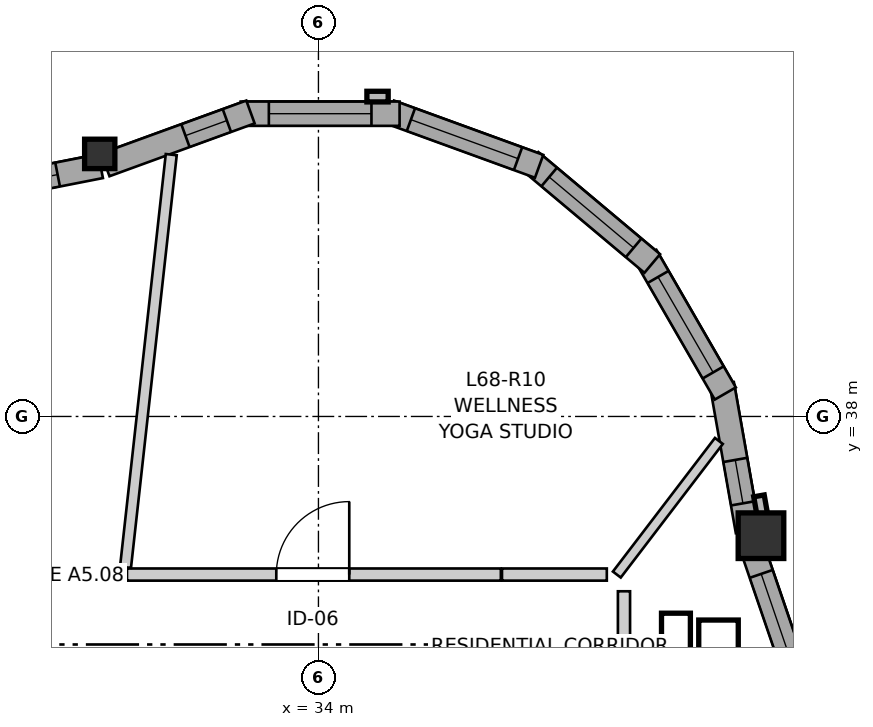
"""IFC4 building model, lengths in metres.
Left out: names, types, materials, properties, quantities, classifications, styles, units other than length and angle.
Written with IfcOpenShell. Run it as: python <this file> out.ifc"""

import sys

from ifc_helpers import new_model, si_unit, direction, frame, frame_2d, origin, origin_2d, place, context, subcontext, project, spatial, rectangle, i_section, extrude, source, transform, mapped, element, fill, save


model = new_model("IFC4")
c1 = context("Model", 3, precision=1e-05, world=origin(), true_north=direction((0.0, 1.0)))
c2 = subcontext(c1, "Body", "Model", "MODEL_VIEW")
j1 = project(units=[si_unit("LENGTHUNIT", "METRE"), si_unit("PLANEANGLEUNIT", "RADIAN")], contexts=[c1])
p1 = place(None, origin())
s1 = spatial("IfcSite", under=j1, at=p1, CompositionType="ELEMENT")
p2 = place(p1, origin())
s2 = spatial("IfcBuilding", under=s1, at=p2, CompositionType="ELEMENT")
p3 = place(p2, frame((0.0, 0.0, 227.6)))
s3 = spatial("IfcBuildingStorey", under=s2, at=p3, CompositionType="ELEMENT", Elevation=227.6)
m1 = source(origin(), c2, "Body", "SweptSolid", [
    extrude(rectangle(XDim=0.6, YDim=0.6, at=origin_2d()), origin(), (0.0, 0.0, 1.0), 2.96),
])
p4 = place(p3, frame((39.823, 36.431, 0.0), z_axis=(0.0, 0.0, 1.0), x_axis=(1.0, 0.0, 0.0)))
e1 = element("IfcColumn", 1, at=p4, inside=s3, PredefinedType="COLUMN", context=c2, shape_type="MappedRepresentation", body=[
    mapped(m1, transform((0.0, 0.0, 0.0), x_axis=(1.0, 0.0, 0.0), y_axis=(0.0, 1.0, 0.0), z_axis=(0.0, 0.0, 1.0), scale=1.0)),
])
m2 = source(origin(), c2, "Body", "SweptSolid", [
    extrude(i_section(OverallWidth=0.398, OverallDepth=0.387, WebThickness=0.019, FlangeThickness=0.03, FilletRadius=0.015, at=origin_2d()), origin(), (0.0, 0.0, 1.0), 2.96),
])
p5 = place(p3, frame((31.123, 41.454, 0.0), z_axis=(0.0, 0.0, 1.0), x_axis=(1.0, 0.0, 0.0)))
e2 = element("IfcColumn", 2, at=p5, inside=s3, PredefinedType="PILASTER", context=c2, shape_type="MappedRepresentation", body=[
    mapped(m2, transform((0.0, 0.0, 0.0), x_axis=(1.0, 0.0, 0.0), y_axis=(0.0, 1.0, 0.0), z_axis=(0.0, 0.0, 1.0), scale=1.0)),
])
p6 = place(p3, frame((40.397, 34.257, 0.0), z_axis=(0.0, 0.0, 1.0), x_axis=(-0.323634249216, 0.9461822619, 0.0)))
e3 = element("IfcWall", 3, at=p6, inside=s3, PredefinedType="SOLIDWALL", context=c2, shape_type="SweptSolid", body=[
    extrude(rectangle(XDim=2.153, YDim=0.32, at=frame_2d((1.077, 0.0))), origin(), (0.0, 0.0, 1.0), 2.58),
])
p7 = place(p6, frame((0.316, 0.0, 0.82)))
e4 = element("IfcOpeningElement", 4, at=p7, cuts=e3, PredefinedType="OPENING", context=c2, shape_type="SweptSolid", body=[
    extrude(rectangle(XDim=1.45, YDim=1.25, at=frame_2d((0.725, 0.625))), frame((0.0, 0.17, 0.0), z_axis=(0.0, -1.0, 0.0), x_axis=(1.0, 0.0, 0.0)), (0.0, 0.0, 1.0), 0.34),
])
p8 = place(p3, frame((39.649, 36.492, 0.0), z_axis=(0.0, 0.0, 1.0), x_axis=(-0.173693060482, 0.984799837906, 0.0)))
e5 = element("IfcWall", 5, at=p8, inside=s3, PredefinedType="SOLIDWALL", context=c2, shape_type="SweptSolid", body=[
    extrude(rectangle(XDim=1.962, YDim=0.32, at=frame_2d((0.981, 0.0))), origin(), (0.0, 0.0, 1.0), 2.58),
])
p9 = place(p8, frame((0.371, 0.0, 0.82)))
e6 = element("IfcOpeningElement", 6, at=p9, cuts=e5, PredefinedType="OPENING", context=c2, shape_type="SweptSolid", body=[
    extrude(rectangle(XDim=0.58, YDim=1.35, at=frame_2d((0.29, 0.675))), frame((0.0, 0.17, 0.0), z_axis=(0.0, -1.0, 0.0), x_axis=(1.0, 0.0, 0.0)), (0.0, 0.0, 1.0), 0.34),
])
p10 = place(p3, frame((39.353, 38.302, 0.0), z_axis=(0.0, 0.0, 1.0), x_axis=(-0.49990781971, 0.866078617559, 0.0)))
e7 = element("IfcWall", 7, at=p10, inside=s3, PredefinedType="SOLIDWALL", context=c2, shape_type="SweptSolid", body=[
    extrude(rectangle(XDim=2.09, YDim=0.32, at=frame_2d((1.045, 0.0))), origin(), (0.0, 0.0, 1.0), 2.58),
])
p11 = place(p10, frame((0.32, 0.0, 0.82)))
e8 = element("IfcOpeningElement", 8, at=p11, cuts=e7, PredefinedType="OPENING", context=c2, shape_type="SweptSolid", body=[
    extrude(rectangle(XDim=1.45, YDim=1.25, at=frame_2d((0.725, 0.625))), frame((0.0, 0.17, 0.0), z_axis=(0.0, -1.0, 0.0), x_axis=(1.0, 0.0, 0.0)), (0.0, 0.0, 1.0), 0.34),
])
p12 = place(p3, frame((38.392, 40.012, 0.0), z_axis=(0.0, 0.0, 1.0), x_axis=(-0.766024572719, 0.642811289563, 0.0)))
e9 = element("IfcWall", 9, at=p12, inside=s3, PredefinedType="SOLIDWALL", context=c2, shape_type="SweptSolid", body=[
    extrude(rectangle(XDim=2.09, YDim=0.32, at=frame_2d((1.045, 0.0))), origin(), (0.0, 0.0, 1.0), 2.58),
])
p13 = place(p12, frame((0.32, 0.0, 0.82)))
e10 = element("IfcOpeningElement", 10, at=p13, cuts=e9, PredefinedType="OPENING", context=c2, shape_type="SweptSolid", body=[
    extrude(rectangle(XDim=1.45, YDim=1.25, at=frame_2d((0.725, 0.625))), frame((0.0, 0.17, 0.0), z_axis=(0.0, -1.0, 0.0), x_axis=(1.0, 0.0, 0.0)), (0.0, 0.0, 1.0), 0.34),
])
p14 = place(p3, frame((36.904, 41.291, 0.0), z_axis=(0.0, 0.0, 1.0), x_axis=(-0.939711556618, 0.341968113072, 0.0)))
e11 = element("IfcWall", 11, at=p14, inside=s3, PredefinedType="SOLIDWALL", context=c2, shape_type="SweptSolid", body=[
    extrude(rectangle(XDim=2.09, YDim=0.32, at=frame_2d((1.045, 0.0))), origin(), (0.0, 0.0, 1.0), 2.58),
])
p15 = place(p14, frame((0.295, 0.0, 0.82)))
e12 = element("IfcOpeningElement", 12, at=p15, cuts=e11, PredefinedType="OPENING", context=c2, shape_type="SweptSolid", body=[
    extrude(rectangle(XDim=1.5, YDim=1.45, at=frame_2d((0.75, 0.725))), frame((0.0, 0.17, 0.0), z_axis=(0.0, -1.0, 0.0), x_axis=(1.0, 0.0, 0.0)), (0.0, 0.0, 1.0), 0.34),
])
p16 = place(p3, frame((35.068, 41.983, 0.0), z_axis=(0.0, 0.0, 1.0), x_axis=(-1.0, 0.0, 0.0)))
e13 = element("IfcWall", 13, at=p16, inside=s3, PredefinedType="SOLIDWALL", context=c2, shape_type="SweptSolid", body=[
    extrude(rectangle(XDim=2.09, YDim=0.32, at=frame_2d((1.045, 0.0))), origin(), (0.0, 0.0, 1.0), 2.58),
])
p17 = place(p16, frame((0.37, 0.0, 0.82)))
e14 = element("IfcOpeningElement", 14, at=p17, cuts=e13, PredefinedType="OPENING", context=c2, shape_type="SweptSolid", body=[
    extrude(rectangle(XDim=1.35, YDim=1.45, at=frame_2d((0.675, 0.725))), frame((0.0, 0.17, 0.0), z_axis=(0.0, -1.0, 0.0), x_axis=(1.0, 0.0, 0.0)), (0.0, 0.0, 1.0), 0.34),
])
p18 = place(p3, frame((33.106, 42.006, 0.0), z_axis=(0.0, 0.0, 1.0), x_axis=(-0.939691662178, -0.342022777067, 0.0)))
e15 = element("IfcWall", 15, at=p18, inside=s3, PredefinedType="SOLIDWALL", context=c2, shape_type="SweptSolid", body=[
    extrude(rectangle(XDim=2.032, YDim=0.32, at=frame_2d((1.016, 0.0))), origin(), (0.0, 0.0, 1.0), 2.58),
])
p19 = place(p18, frame((0.33, 0.0, 0.82)))
e16 = element("IfcOpeningElement", 16, at=p19, cuts=e15, PredefinedType="OPENING", context=c2, shape_type="SweptSolid", body=[
    extrude(rectangle(XDim=0.58, YDim=1.35, at=frame_2d((0.29, 0.675))), frame((0.0, 0.17, 0.0), z_axis=(0.0, -1.0, 0.0), x_axis=(1.0, 0.0, 0.0)), (0.0, 0.0, 1.0), 0.34),
])
p20 = place(p3, frame((31.134, 41.293, 0.0), z_axis=(0.0, 0.0, 1.0), x_axis=(-0.981246594798, -0.19275663464, 0.0)))
e17 = element("IfcWall", 17, at=p20, inside=s3, PredefinedType="SOLIDWALL", context=c2, shape_type="SweptSolid", body=[
    extrude(rectangle(XDim=2.223, YDim=0.32, at=frame_2d((1.111, 0.0))), origin(), (0.0, 0.0, 1.0), 2.58),
])
p21 = place(p20, frame((0.576, 0.0, 0.82)))
e18 = element("IfcOpeningElement", 18, at=p21, cuts=e17, PredefinedType="OPENING", context=c2, shape_type="SweptSolid", body=[
    extrude(rectangle(XDim=1.05, YDim=1.45, at=frame_2d((0.525, 0.725))), frame((0.0, 0.17, 0.0), z_axis=(0.0, -1.0, 0.0), x_axis=(1.0, 0.0, 0.0)), (0.0, 0.0, 1.0), 0.34),
])
p22 = place(p3, frame((26.138, 35.92, 0.0), z_axis=(0.0, 0.0, 1.0), x_axis=(1.0, 0.0, 0.0)))
e19 = element("IfcWall", 19, at=p22, inside=s3, PredefinedType="PARTITIONING", context=c2, shape_type="SweptSolid", body=[
    extrude(rectangle(XDim=5.328, YDim=0.16, at=frame_2d((2.664, 0.0))), origin(), (0.0, 0.0, 1.0), 2.96),
])
p23 = place(p22, frame((2.185, 0.0, 0.0)))
e20 = element("IfcOpeningElement", 20, at=p23, cuts=e19, PredefinedType="OPENING", context=c2, shape_type="SweptSolid", body=[
    extrude(rectangle(XDim=0.96, YDim=2.1, at=frame_2d((0.48, 1.05))), frame((0.0, 0.09, 0.0), z_axis=(0.0, -1.0, 0.0), x_axis=(1.0, 0.0, 0.0)), (0.0, 0.0, 1.0), 0.18),
])
p24 = place(p3, frame((31.481, 35.92, 0.0), z_axis=(0.0, 0.0, 1.0), x_axis=(1.0, 0.0, 0.0)))
e21 = element("IfcWall", 21, at=p24, inside=s3, PredefinedType="PARTITIONING", context=c2, shape_type="SweptSolid", body=[
    extrude(rectangle(XDim=4.919, YDim=0.16, at=frame_2d((2.459, 0.0))), origin(), (0.0, 0.0, 1.0), 2.598),
])
p25 = place(p24, frame((1.965, 0.0, 0.0)))
e22 = element("IfcOpeningElement", 22, at=p25, cuts=e21, PredefinedType="OPENING", context=c2, shape_type="SweptSolid", body=[
    extrude(rectangle(XDim=0.96, YDim=2.1, at=frame_2d((0.48, 1.05))), frame((0.0, 0.09, 0.0), z_axis=(0.0, -1.0, 0.0), x_axis=(1.0, 0.0, 0.0)), (0.0, 0.0, 1.0), 0.18),
])
p26 = place(p3, frame((31.462, 36.016, 0.0), z_axis=(0.0, 0.0, 1.0), x_axis=(0.11018132109, 0.993911503346, 0.0)))
e23 = element("IfcWall", 23, at=p26, inside=s3, PredefinedType="PARTITIONING", context=c2, shape_type="SweptSolid", body=[
    extrude(rectangle(XDim=5.462, YDim=0.145, at=frame_2d((2.731, 0.0))), origin(), (0.0, 0.0, 1.0), 2.96),
])
p27 = place(p3, frame((37.926, 35.92, 0.0), z_axis=(0.0, 0.0, 1.0), x_axis=(0.606987113509, 0.794711673523, 0.0)))
e24 = element("IfcWall", 24, at=p27, inside=s3, PredefinedType="PARTITIONING", context=c2, shape_type="SweptSolid", body=[
    extrude(rectangle(XDim=2.212, YDim=0.13, at=frame_2d((1.106, 0.0))), origin(), (0.0, 0.0, 1.0), 2.96),
])
p28 = place(p3, frame((38.02, 34.315, 0.0), z_axis=(0.0, 0.0, 1.0), x_axis=(0.0, 1.0, 0.0)))
e25 = element("IfcWall", 25, at=p28, inside=s3, PredefinedType="PARTITIONING", context=c2, shape_type="SweptSolid", body=[
    extrude(rectangle(XDim=1.385, YDim=0.16, at=frame_2d((0.693, 0.0))), origin(), (0.0, 0.0, 1.0), 2.96),
])
p29 = place(p3, frame((36.415, 35.92, 0.0), z_axis=(0.0, 0.0, 1.0), x_axis=(1.0, 0.0, 0.0)))
e26 = element("IfcWall", 26, at=p29, inside=s3, PredefinedType="PARTITIONING", context=c2, shape_type="SweptSolid", body=[
    extrude(rectangle(XDim=1.379, YDim=0.16, at=frame_2d((0.689, 0.0))), origin(), (0.0, 0.0, 1.0), 2.598),
])
m3 = source(origin(), c2, "Body", "SweptSolid", [
    extrude(rectangle(XDim=1.45, YDim=1.25, at=frame_2d((0.725, 0.625))), frame((0.0, 0.03, 0.0), z_axis=(0.0, -1.0, 0.0), x_axis=(1.0, 0.0, 0.0)), (0.0, 0.0, 1.0), 0.06),
])
p30 = place(p7, origin())
e27 = element("IfcWindow", 27, at=p30, inside=s3, PartitioningType="SINGLE_PANEL", PredefinedType="WINDOW", context=c2, shape_type="MappedRepresentation", body=[
    mapped(m3, transform((0.0, 0.0, 0.0), x_axis=(1.0, 0.0, 0.0), y_axis=(0.0, 1.0, 0.0), z_axis=(0.0, 0.0, 1.0), scale=1.0)),
])
fill(e4, e27)
m4 = source(origin(), c2, "Body", "SweptSolid", [
    extrude(rectangle(XDim=0.58, YDim=1.35, at=frame_2d((0.29, 0.675))), frame((0.0, 0.03, 0.0), z_axis=(0.0, -1.0, 0.0), x_axis=(1.0, 0.0, 0.0)), (0.0, 0.0, 1.0), 0.06),
])
p31 = place(p9, origin())
e28 = element("IfcWindow", 28, at=p31, inside=s3, PartitioningType="SINGLE_PANEL", PredefinedType="WINDOW", context=c2, shape_type="MappedRepresentation", body=[
    mapped(m4, transform((0.0, 0.0, 0.0), x_axis=(1.0, 0.0, 0.0), y_axis=(0.0, 1.0, 0.0), z_axis=(0.0, 0.0, 1.0), scale=1.0)),
])
fill(e6, e28)
p32 = place(p11, origin())
e29 = element("IfcWindow", 29, at=p32, inside=s3, PartitioningType="SINGLE_PANEL", PredefinedType="WINDOW", context=c2, shape_type="MappedRepresentation", body=[
    mapped(m3, transform((0.0, 0.0, 0.0), x_axis=(1.0, 0.0, 0.0), y_axis=(0.0, 1.0, 0.0), z_axis=(0.0, 0.0, 1.0), scale=1.0)),
])
fill(e8, e29)
p33 = place(p13, origin())
e30 = element("IfcWindow", 30, at=p33, inside=s3, PartitioningType="SINGLE_PANEL", PredefinedType="WINDOW", context=c2, shape_type="MappedRepresentation", body=[
    mapped(m3, transform((0.0, 0.0, 0.0), x_axis=(1.0, 0.0, 0.0), y_axis=(0.0, 1.0, 0.0), z_axis=(0.0, 0.0, 1.0), scale=1.0)),
])
fill(e10, e30)
m5 = source(origin(), c2, "Body", "SweptSolid", [
    extrude(rectangle(XDim=1.5, YDim=1.45, at=frame_2d((0.75, 0.725))), frame((0.0, 0.03, 0.0), z_axis=(0.0, -1.0, 0.0), x_axis=(1.0, 0.0, 0.0)), (0.0, 0.0, 1.0), 0.06),
])
p34 = place(p15, origin())
e31 = element("IfcWindow", 31, at=p34, inside=s3, PartitioningType="SINGLE_PANEL", PredefinedType="WINDOW", context=c2, shape_type="MappedRepresentation", body=[
    mapped(m5, transform((0.0, 0.0, 0.0), x_axis=(1.0, 0.0, 0.0), y_axis=(0.0, 1.0, 0.0), z_axis=(0.0, 0.0, 1.0), scale=1.0)),
])
fill(e12, e31)
m6 = source(origin(), c2, "Body", "SweptSolid", [
    extrude(rectangle(XDim=1.35, YDim=1.45, at=frame_2d((0.675, 0.725))), frame((0.0, 0.03, 0.0), z_axis=(0.0, -1.0, 0.0), x_axis=(1.0, 0.0, 0.0)), (0.0, 0.0, 1.0), 0.06),
])
p35 = place(p17, origin())
e32 = element("IfcWindow", 32, at=p35, inside=s3, PartitioningType="SINGLE_PANEL", PredefinedType="WINDOW", context=c2, shape_type="MappedRepresentation", body=[
    mapped(m6, transform((0.0, 0.0, 0.0), x_axis=(1.0, 0.0, 0.0), y_axis=(0.0, 1.0, 0.0), z_axis=(0.0, 0.0, 1.0), scale=1.0)),
])
fill(e14, e32)
p36 = place(p19, origin())
e33 = element("IfcWindow", 33, at=p36, inside=s3, PartitioningType="SINGLE_PANEL", PredefinedType="WINDOW", context=c2, shape_type="MappedRepresentation", body=[
    mapped(m4, transform((0.0, 0.0, 0.0), x_axis=(1.0, 0.0, 0.0), y_axis=(0.0, 1.0, 0.0), z_axis=(0.0, 0.0, 1.0), scale=1.0)),
])
fill(e16, e33)
m7 = source(origin(), c2, "Body", "SweptSolid", [
    extrude(rectangle(XDim=1.05, YDim=1.45, at=frame_2d((0.525, 0.725))), frame((0.0, 0.03, 0.0), z_axis=(0.0, -1.0, 0.0), x_axis=(1.0, 0.0, 0.0)), (0.0, 0.0, 1.0), 0.06),
])
p37 = place(p21, origin())
e34 = element("IfcWindow", 34, at=p37, inside=s3, PartitioningType="SINGLE_PANEL", PredefinedType="WINDOW", context=c2, shape_type="MappedRepresentation", body=[
    mapped(m7, transform((0.0, 0.0, 0.0), x_axis=(1.0, 0.0, 0.0), y_axis=(0.0, 1.0, 0.0), z_axis=(0.0, 0.0, 1.0), scale=1.0)),
])
fill(e18, e34)
m8 = source(origin(), c2, "Body", "SweptSolid", [
    extrude(rectangle(XDim=0.96, YDim=2.1, at=frame_2d((0.48, 1.05))), frame((0.0, 0.025, 0.0), z_axis=(0.0, -1.0, 0.0), x_axis=(1.0, 0.0, 0.0)), (0.0, 0.0, 1.0), 0.05),
])
p38 = place(p25, origin())
e35 = element("IfcDoor", 35, at=p38, inside=s3, OperationType="SINGLE_SWING_RIGHT", PredefinedType="DOOR", context=c2, shape_type="MappedRepresentation", body=[
    mapped(m8, transform((0.0, 0.0, 0.0), x_axis=(1.0, 0.0, 0.0), y_axis=(0.0, 1.0, 0.0), z_axis=(0.0, 0.0, 1.0), scale=1.0)),
])
fill(e22, e35)
save(model, sys.argv[1])
